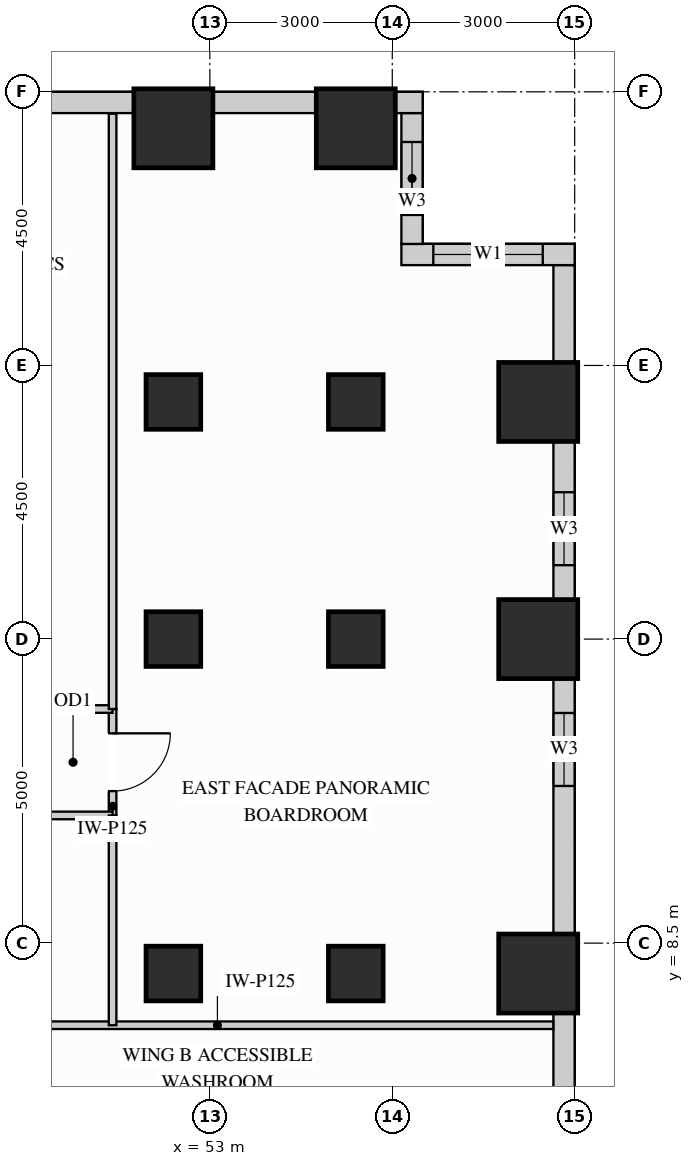
"""IFC4 building model, lengths in metres.
Left out: names, types, materials, properties, quantities, classifications, styles, units other than length and angle.
Written with IfcOpenShell. Run it as: python <this file> out.ifc"""

import sys

from ifc_helpers import new_model, si_unit, direction, frame, frame_2d, origin, origin_2d, place, context, subcontext, project, spatial, rectangle, extrude, source, transform, mapped, element, fill, save


model = new_model("IFC4")
c1 = context("Model", 3, precision=1e-05, world=origin(), true_north=direction((0.0, 1.0)))
c2 = subcontext(c1, "Body", "Model", "MODEL_VIEW")
j1 = project(units=[si_unit("LENGTHUNIT", "METRE"), si_unit("PLANEANGLEUNIT", "RADIAN")], contexts=[c1])
p1 = place(None, origin())
s1 = spatial("IfcSite", under=j1, at=p1, CompositionType="ELEMENT")
p2 = place(p1, origin())
s2 = spatial("IfcBuilding", under=s1, at=p2, CompositionType="ELEMENT")
p3 = place(p2, frame((0.0, 0.0, 40.5)))
s3 = spatial("IfcBuildingStorey", under=s2, at=p3, CompositionType="ELEMENT", Elevation=40.5)
m1 = source(origin(), c2, "Body", "SweptSolid", [
    extrude(rectangle(XDim=0.9, YDim=0.9, at=origin_2d()), origin(), (0.0, 0.0, 1.0), 3.38),
])
for number, where, z_axis, x_axis in (
    (1, (52.4, 13.5, 0.0), (0.0, 0.0, 1.0), (1.0, 0.0, 0.0)),
    (2, (52.4, 17.4, 0.0), (0.0, 0.0, 1.0), (1.0, 0.0, 0.0)),
    (3, (52.4, 8.0, 0.0), (0.0, 0.0, 1.0), (1.0, 0.0, 0.0)),
    (4, (55.4, 13.5, 0.0), (0.0, 0.0, 1.0), (1.0, 0.0, 0.0)),
    (5, (55.4, 17.4, 0.0), (0.0, 0.0, 1.0), (1.0, 0.0, 0.0)),
    (6, (55.4, 8.0, 0.0), (0.0, 0.0, 1.0), (1.0, 0.0, 0.0)),
):
    element("IfcColumn", number, at=place(p3, frame(where, z_axis=z_axis, x_axis=x_axis)), inside=s3, PredefinedType="COLUMN", context=c2, shape_type="MappedRepresentation", body=[
        mapped(m1, transform((0.0, 0.0, 0.0), x_axis=(1.0, 0.0, 0.0), y_axis=(0.0, 1.0, 0.0), z_axis=(0.0, 0.0, 1.0))),
    ])
m2 = source(origin(), c2, "Body", "SweptSolid", [
    extrude(rectangle(XDim=1.3, YDim=1.3, at=origin_2d()), origin(), (0.0, 0.0, 1.0), 3.38),
])
for number, where, z_axis, x_axis in (
    (7, (52.4, 21.9, 0.0), (0.0, 0.0, 1.0), (1.0, 0.0, 0.0)),
    (8, (55.4, 21.9, 0.0), (0.0, 0.0, 1.0), (1.0, 0.0, 0.0)),
    (9, (58.4, 13.5, 0.0), (0.0, 0.0, 1.0), (1.0, 0.0, 0.0)),
    (10, (58.4, 17.4, 0.0), (0.0, 0.0, 1.0), (1.0, 0.0, 0.0)),
    (11, (58.4, 8.0, 0.0), (0.0, 0.0, 1.0), (1.0, 0.0, 0.0)),
):
    element("IfcColumn", number, at=place(p3, frame(where, z_axis=z_axis, x_axis=x_axis)), inside=s3, PredefinedType="COLUMN", context=c2, shape_type="MappedRepresentation", body=[
        mapped(m2, transform((0.0, 0.0, 0.0), x_axis=(1.0, 0.0, 0.0), y_axis=(0.0, 1.0, 0.0), z_axis=(0.0, 0.0, 1.0))),
    ])
m3 = source(origin(), c2, "Body", "SweptSolid", [
    extrude(rectangle(XDim=3.204, YDim=0.35, at=frame_2d((1.602, 0.0))), origin(), (0.0, 0.0, 1.0), 2.51),
])
p4 = place(p3, frame((58.825, 4.148, 0.0), z_axis=(0.0, 0.0, 1.0), x_axis=(0.0, 1.0, 0.0)))
e12 = element("IfcWall", 12, at=p4, inside=s3, PredefinedType="SOLIDWALL", context=c2, shape_type="MappedRepresentation", body=[
    mapped(m3, transform((0.0, 0.0, 0.0), x_axis=(1.0, 0.0, 0.0), y_axis=(0.0, 1.0, 0.0), z_axis=(0.0, 0.0, 1.0))),
])
p5 = place(p3, frame((58.825, 8.648, 0.0), z_axis=(0.0, 0.0, 1.0), x_axis=(0.0, 1.0, 0.0)))
e13 = element("IfcWall", 13, at=p5, inside=s3, PredefinedType="SOLIDWALL", context=c2, shape_type="SweptSolid", body=[
    extrude(rectangle(XDim=4.204, YDim=0.35, at=frame_2d((2.102, 0.0))), origin(), (0.0, 0.0, 1.0), 2.51),
])
p6 = place(p5, frame((2.437, 0.0, 0.78)))
e14 = element("IfcOpeningElement", 14, at=p6, cuts=e13, PredefinedType="OPENING", context=c2, shape_type="SweptSolid", body=[
    extrude(rectangle(XDim=1.2, YDim=1.55, at=frame_2d((0.6, 0.775))), frame((0.0, 0.185, 0.0), z_axis=(0.0, -1.0, 0.0), x_axis=(1.0, 0.0, 0.0)), (0.0, 0.0, 1.0), 0.37),
])
p7 = place(p3, frame((58.825, 14.148, 0.0), z_axis=(0.0, 0.0, 1.0), x_axis=(0.0, 1.0, 0.0)))
e15 = element("IfcWall", 15, at=p7, inside=s3, PredefinedType="SOLIDWALL", context=c2, shape_type="SweptSolid", body=[
    extrude(rectangle(XDim=2.604, YDim=0.35, at=frame_2d((1.302, 0.0))), origin(), (0.0, 0.0, 1.0), 2.51),
])
p8 = place(p7, frame((0.567, 0.0, 0.78)))
e16 = element("IfcOpeningElement", 16, at=p8, cuts=e15, PredefinedType="OPENING", context=c2, shape_type="SweptSolid", body=[
    extrude(rectangle(XDim=1.2, YDim=1.55, at=frame_2d((0.6, 0.775))), frame((0.0, 0.185, 0.0), z_axis=(0.0, -1.0, 0.0), x_axis=(1.0, 0.0, 0.0)), (0.0, 0.0, 1.0), 0.37),
])
m4 = source(origin(), c2, "Body", "SweptSolid", [
    extrude(rectangle(XDim=1.604, YDim=0.35, at=frame_2d((0.802, 0.0))), origin(), (0.0, 0.0, 1.0), 3.365),
])
p9 = place(p3, frame((58.825, 18.048, 0.0), z_axis=(0.0, 0.0, 1.0), x_axis=(0.0, 1.0, 0.0)))
e17 = element("IfcWall", 17, at=p9, inside=s3, PredefinedType="SOLIDWALL", context=c2, shape_type="MappedRepresentation", body=[
    mapped(m4, transform((0.0, 0.0, 0.0), x_axis=(1.0, 0.0, 0.0), y_axis=(0.0, 1.0, 0.0), z_axis=(0.0, 0.0, 1.0))),
])
p10 = place(p3, frame((59.0, 19.825, 0.0), z_axis=(0.0, 0.0, 1.0), x_axis=(-1.0, 0.0, 0.0)))
e18 = element("IfcWall", 18, at=p10, inside=s3, PredefinedType="SOLIDWALL", context=c2, shape_type="SweptSolid", body=[
    extrude(rectangle(XDim=2.85, YDim=0.35, at=frame_2d((1.425, 0.0))), origin(), (0.0, 0.0, 1.0), 3.365),
])
p11 = place(p10, frame((0.525, 0.0, 0.78)))
e19 = element("IfcOpeningElement", 19, at=p11, cuts=e18, PredefinedType="OPENING", context=c2, shape_type="SweptSolid", body=[
    extrude(rectangle(XDim=1.8, YDim=2.1, at=frame_2d((0.9, 1.05))), frame((0.0, 0.185, 0.0), z_axis=(0.0, -1.0, 0.0), x_axis=(1.0, 0.0, 0.0)), (0.0, 0.0, 1.0), 0.37),
])
p12 = place(p3, frame((56.325, 19.998, 0.0), z_axis=(0.0, 0.0, 1.0), x_axis=(0.0, 1.0, 0.0)))
e20 = element("IfcWall", 20, at=p12, inside=s3, PredefinedType="SOLIDWALL", context=c2, shape_type="SweptSolid", body=[
    extrude(rectangle(XDim=2.154, YDim=0.35, at=frame_2d((1.077, 0.0))), origin(), (0.0, 0.0, 1.0), 3.365),
])
p13 = place(p12, frame((0.477, 0.0, 0.78)))
e21 = element("IfcOpeningElement", 21, at=p13, cuts=e20, PredefinedType="OPENING", context=c2, shape_type="SweptSolid", body=[
    extrude(rectangle(XDim=1.2, YDim=2.1, at=frame_2d((0.6, 1.05))), frame((0.0, 0.185, 0.0), z_axis=(0.0, -1.0, 0.0), x_axis=(1.0, 0.0, 0.0)), (0.0, 0.0, 1.0), 0.37),
])
m5 = source(origin(), c2, "Body", "SweptSolid", [
    extrude(rectangle(XDim=0.452, YDim=0.35, at=frame_2d((0.226, 0.0))), origin(), (0.0, 0.0, 1.0), 3.365),
])
p14 = place(p3, frame((56.5, 22.325, 0.0), z_axis=(0.0, 0.0, 1.0), x_axis=(-1.0, 0.0, 0.0)))
e22 = element("IfcWall", 22, at=p14, inside=s3, PredefinedType="SOLIDWALL", context=c2, shape_type="MappedRepresentation", body=[
    mapped(m5, transform((0.0, 0.0, 0.0), x_axis=(1.0, 0.0, 0.0), y_axis=(0.0, 1.0, 0.0), z_axis=(0.0, 0.0, 1.0))),
])
m6 = source(origin(), c2, "Body", "SweptSolid", [
    extrude(rectangle(XDim=1.704, YDim=0.35, at=frame_2d((0.852, 0.0))), origin(), (0.0, 0.0, 1.0), 2.51),
])
for number, where, z_axis, x_axis in (
    (23, (54.752, 22.325, 0.0), (0.0, 0.0, 1.0), (-1.0, 0.0, 0.0)),
    (24, (51.752, 22.325, 0.0), (0.0, 0.0, 1.0), (-1.0, 0.0, 0.0)),
):
    element("IfcWall", number, at=place(p3, frame(where, z_axis=z_axis, x_axis=x_axis)), inside=s3, PredefinedType="SOLIDWALL", context=c2, shape_type="MappedRepresentation", body=[
        mapped(m6, transform((0.0, 0.0, 0.0), x_axis=(1.0, 0.0, 0.0), y_axis=(0.0, 1.0, 0.0), z_axis=(0.0, 0.0, 1.0))),
    ])
p15 = place(p3, frame((51.4, 10.6, 0.0), z_axis=(0.0, 0.0, 1.0), x_axis=(0.0, 1.0, 0.0)))
e25 = element("IfcWall", 25, at=p15, inside=s3, PredefinedType="PARTITIONING", context=c2, shape_type="SweptSolid", body=[
    extrude(rectangle(XDim=1.75, YDim=0.125, at=frame_2d((0.875, 0.0))), origin(), (0.0, 0.0, 1.0), 3.365),
])
p16 = place(p15, frame((0.4, 0.0, 0.0)))
e26 = element("IfcOpeningElement", 26, at=p16, cuts=e25, PredefinedType="OPENING", context=c2, shape_type="SweptSolid", body=[
    extrude(rectangle(XDim=0.95, YDim=2.15, at=frame_2d((0.475, 1.075))), frame((0.0, 0.073, 0.0), z_axis=(0.0, -1.0, 0.0), x_axis=(1.0, 0.0, 0.0)), (0.0, 0.0, 1.0), 0.145),
])
m7 = source(origin(), c2, "Body", "SweptSolid", [
    extrude(rectangle(XDim=11.048, YDim=0.125, at=frame_2d((5.524, 0.0))), origin(), (0.0, 0.0, 1.0), 3.365),
])
p17 = place(p3, frame((47.6, 7.15, 0.0), z_axis=(0.0, 0.0, 1.0), x_axis=(1.0, 0.0, 0.0)))
e27 = element("IfcWall", 27, at=p17, inside=s3, PredefinedType="PARTITIONING", context=c2, shape_type="MappedRepresentation", body=[
    mapped(m7, transform((0.0, 0.0, 0.0), x_axis=(1.0, 0.0, 0.0), y_axis=(0.0, 1.0, 0.0), z_axis=(0.0, 0.0, 1.0))),
])
m8 = source(origin(), c2, "Body", "SweptSolid", [
    extrude(rectangle(XDim=3.8, YDim=0.125, at=frame_2d((1.9, 0.0))), origin(), (0.0, 0.0, 1.0), 3.365),
])
p18 = place(p3, frame((47.6, 12.35, 0.0), z_axis=(0.0, 0.0, 1.0), x_axis=(1.0, 0.0, 0.0)))
e28 = element("IfcWall", 28, at=p18, inside=s3, PredefinedType="PARTITIONING", context=c2, shape_type="MappedRepresentation", body=[
    mapped(m8, transform((0.0, 0.0, 0.0), x_axis=(1.0, 0.0, 0.0), y_axis=(0.0, 1.0, 0.0), z_axis=(0.0, 0.0, 1.0))),
])
p19 = place(p3, frame((47.6, 10.6, 0.0), z_axis=(0.0, 0.0, 1.0), x_axis=(1.0, 0.0, 0.0)))
e29 = element("IfcWall", 29, at=p19, inside=s3, PredefinedType="PARTITIONING", context=c2, shape_type="SweptSolid", body=[
    extrude(rectangle(XDim=3.8, YDim=0.125, at=frame_2d((1.9, 0.0))), origin(), (0.0, 0.0, 1.0), 2.67),
])
p20 = place(p19, frame((1.425, 0.0, 0.0)))
e30 = element("IfcOpeningElement", 30, at=p20, cuts=e29, PredefinedType="OPENING", context=c2, shape_type="SweptSolid", body=[
    extrude(rectangle(XDim=0.95, YDim=2.15, at=frame_2d((0.475, 1.075))), frame((0.0, 0.073, 0.0), z_axis=(0.0, -1.0, 0.0), x_axis=(1.0, 0.0, 0.0)), (0.0, 0.0, 1.0), 0.145),
])
m9 = source(origin(), c2, "Body", "SweptSolid", [
    extrude(rectangle(XDim=3.45, YDim=0.125, at=frame_2d((1.725, 0.0))), origin(), (0.0, 0.0, 1.0), 3.365),
])
p21 = place(p3, frame((51.4, 7.15, 0.0), z_axis=(0.0, 0.0, 1.0), x_axis=(0.0, 1.0, 0.0)))
e31 = element("IfcWall", 31, at=p21, inside=s3, PredefinedType="PARTITIONING", context=c2, shape_type="MappedRepresentation", body=[
    mapped(m9, transform((0.0, 0.0, 0.0), x_axis=(1.0, 0.0, 0.0), y_axis=(0.0, 1.0, 0.0), z_axis=(0.0, 0.0, 1.0))),
])
m10 = source(origin(), c2, "Body", "SweptSolid", [
    extrude(rectangle(XDim=9.79, YDim=0.125, at=frame_2d((4.895, 0.0))), origin(), (0.0, 0.0, 1.0), 3.365),
])
p22 = place(p3, frame((51.4, 12.35, 0.0), z_axis=(0.0, 0.0, 1.0), x_axis=(0.0, 1.0, 0.0)))
e32 = element("IfcWall", 32, at=p22, inside=s3, PredefinedType="PARTITIONING", context=c2, shape_type="MappedRepresentation", body=[
    mapped(m10, transform((0.0, 0.0, 0.0), x_axis=(1.0, 0.0, 0.0), y_axis=(0.0, 1.0, 0.0), z_axis=(0.0, 0.0, 1.0))),
])
m11 = source(origin(), c2, "Body", "SweptSolid", [
    extrude(rectangle(XDim=0.95, YDim=2.15, at=frame_2d((0.475, 1.075))), frame((0.0, 0.025, 0.0), z_axis=(0.0, -1.0, 0.0), x_axis=(1.0, 0.0, 0.0)), (0.0, 0.0, 1.0), 0.05),
])
p23 = place(p16, origin())
e33 = element("IfcDoor", 33, at=p23, inside=s3, OperationType="SINGLE_SWING_RIGHT", PredefinedType="DOOR", context=c2, shape_type="MappedRepresentation", body=[
    mapped(m11, transform((0.0, 0.0, 0.0), x_axis=(1.0, 0.0, 0.0), y_axis=(0.0, 1.0, 0.0), z_axis=(0.0, 0.0, 1.0))),
])
fill(e26, e33)
m12 = source(origin(), c2, "Body", "SweptSolid", [
    extrude(rectangle(XDim=1.8, YDim=2.1, at=frame_2d((0.9, 1.05))), frame((0.0, 0.03, 0.0), z_axis=(0.0, -1.0, 0.0), x_axis=(1.0, 0.0, 0.0)), (0.0, 0.0, 1.0), 0.06),
])
p24 = place(p11, origin())
e34 = element("IfcWindow", 34, at=p24, inside=s3, PartitioningType="SINGLE_PANEL", PredefinedType="WINDOW", context=c2, shape_type="MappedRepresentation", body=[
    mapped(m12, transform((0.0, 0.0, 0.0), x_axis=(1.0, 0.0, 0.0), y_axis=(0.0, 1.0, 0.0), z_axis=(0.0, 0.0, 1.0))),
])
fill(e19, e34)
m13 = source(origin(), c2, "Body", "SweptSolid", [
    extrude(rectangle(XDim=1.2, YDim=1.55, at=frame_2d((0.6, 0.775))), frame((0.0, 0.03, 0.0), z_axis=(0.0, -1.0, 0.0), x_axis=(1.0, 0.0, 0.0)), (0.0, 0.0, 1.0), 0.06),
])
p25 = place(p6, origin())
e35 = element("IfcWindow", 35, at=p25, inside=s3, PartitioningType="SINGLE_PANEL", PredefinedType="WINDOW", context=c2, shape_type="MappedRepresentation", body=[
    mapped(m13, transform((0.0, 0.0, 0.0), x_axis=(1.0, 0.0, 0.0), y_axis=(0.0, 1.0, 0.0), z_axis=(0.0, 0.0, 1.0))),
])
fill(e14, e35)
p26 = place(p8, origin())
e36 = element("IfcWindow", 36, at=p26, inside=s3, PartitioningType="SINGLE_PANEL", PredefinedType="WINDOW", context=c2, shape_type="MappedRepresentation", body=[
    mapped(m13, transform((0.0, 0.0, 0.0), x_axis=(1.0, 0.0, 0.0), y_axis=(0.0, 1.0, 0.0), z_axis=(0.0, 0.0, 1.0))),
])
fill(e16, e36)
m14 = source(origin(), c2, "Body", "SweptSolid", [
    extrude(rectangle(XDim=1.2, YDim=2.1, at=frame_2d((0.6, 1.05))), frame((0.0, 0.03, 0.0), z_axis=(0.0, -1.0, 0.0), x_axis=(1.0, 0.0, 0.0)), (0.0, 0.0, 1.0), 0.06),
])
p27 = place(p13, origin())
e37 = element("IfcWindow", 37, at=p27, inside=s3, PartitioningType="SINGLE_PANEL", PredefinedType="WINDOW", context=c2, shape_type="MappedRepresentation", body=[
    mapped(m14, transform((0.0, 0.0, 0.0), x_axis=(1.0, 0.0, 0.0), y_axis=(0.0, 1.0, 0.0), z_axis=(0.0, 0.0, 1.0))),
])
fill(e21, e37)
save(model, sys.argv[1])
